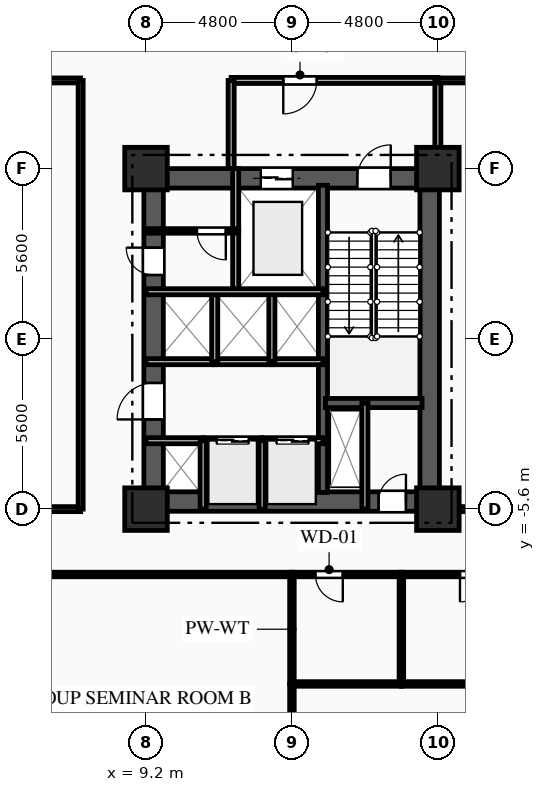
"""IFC4 building model, lengths in metres.
Left out: names, types, materials, properties, quantities, classifications, styles, units other than length and angle.
Written with IfcOpenShell. Run it as: python <this file> out.ifc"""

import sys

from ifc_helpers import new_model, si_unit, direction, frame, frame_2d, origin, origin_2d, place, context, subcontext, project, spatial, rectangle, extrude, element, fill, save


model = new_model("IFC4")
c1 = context("Model", 3, precision=1e-05, world=origin(), true_north=direction((0.0, 1.0)))
c2 = subcontext(c1, "Body", "Model", "MODEL_VIEW")
j1 = project(units=[si_unit("LENGTHUNIT", "METRE"), si_unit("PLANEANGLEUNIT", "RADIAN")], contexts=[c1])
p1 = place(None, origin())
s1 = spatial("IfcSite", under=j1, at=p1, CompositionType="ELEMENT")
p2 = place(p1, origin())
s2 = spatial("IfcBuilding", under=s1, at=p2, CompositionType="ELEMENT")
p3 = place(p2, frame((0.0, 0.0, 4.5)))
s3 = spatial("IfcBuildingStorey", under=s2, at=p3, CompositionType="ELEMENT", Elevation=4.5)
for number, where, z_axis, x_axis in (
    (1, (9.2, -5.6, 0.0), (0.0, 0.0, 1.0), (1.0, 0.0, 0.0)),
    (2, (9.2, 5.6, 0.0), (0.0, 0.0, 1.0), (1.0, 0.0, 0.0)),
    (3, (18.8, -5.6, 0.0), (0.0, 0.0, 1.0), (1.0, 0.0, 0.0)),
    (4, (18.8, 5.6, 0.0), (0.0, 0.0, 1.0), (1.0, 0.0, 0.0)),
):
    element("IfcColumn", number, at=place(p3, frame(where, z_axis=z_axis, x_axis=x_axis)), inside=s3, PredefinedType="COLUMN", context=c2, shape_type="SweptSolid", body=[
        extrude(rectangle(XDim=1.4, YDim=1.4, at=origin_2d()), origin(), (0.0, 0.0, 1.0), 4.5),
    ])
p4 = place(p3, frame((9.2, 5.28, 0.0), z_axis=(0.0, 0.0, 1.0), x_axis=(1.0, 0.0, 0.0)))
e5 = element("IfcWall", 5, at=p4, inside=s3, PredefinedType="SHEAR", context=c2, shape_type="SweptSolid", body=[
    extrude(rectangle(XDim=9.6, YDim=0.64, at=frame_2d((4.8, 0.0))), origin(), (0.0, 0.0, 1.0), 4.17),
])
p5 = place(p4, frame((6.95, 0.0, 0.0)))
e6 = element("IfcOpeningElement", 6, at=p5, cuts=e5, PredefinedType="OPENING", context=c2, shape_type="SweptSolid", body=[
    extrude(rectangle(XDim=1.1, YDim=2.15, at=frame_2d((0.55, 1.075))), frame((0.0, 0.33, 0.0), z_axis=(0.0, -1.0, 0.0), x_axis=(1.0, 0.0, 0.0)), (0.0, 0.0, 1.0), 0.66),
])
p6 = place(p4, frame((3.775, 0.0, 0.0)))
e7 = element("IfcOpeningElement", 7, at=p6, cuts=e5, PredefinedType="OPENING", context=c2, shape_type="SweptSolid", body=[
    extrude(rectangle(XDim=1.05, YDim=2.1, at=frame_2d((0.525, 1.05))), frame((0.0, 0.33, 0.0), z_axis=(0.0, -1.0, 0.0), x_axis=(1.0, 0.0, 0.0)), (0.0, 0.0, 1.0), 0.66),
])
p7 = place(p3, frame((9.2, -5.35, 0.0), z_axis=(0.0, 0.0, 1.0), x_axis=(1.0, 0.0, 0.0)))
e8 = element("IfcWall", 8, at=p7, inside=s3, PredefinedType="SHEAR", context=c2, shape_type="SweptSolid", body=[
    extrude(rectangle(XDim=9.6, YDim=0.64, at=frame_2d((4.8, 0.0))), origin(), (0.0, 0.0, 1.0), 4.17),
])
p8 = place(p7, frame((7.65, 0.0, 0.0)))
e9 = element("IfcOpeningElement", 9, at=p8, cuts=e8, PredefinedType="OPENING", context=c2, shape_type="SweptSolid", body=[
    extrude(rectangle(XDim=0.9, YDim=2.1, at=frame_2d((0.45, 1.05))), frame((0.0, 0.33, 0.0), z_axis=(0.0, -1.0, 0.0), x_axis=(1.0, 0.0, 0.0)), (0.0, 0.0, 1.0), 0.66),
])
p9 = place(p3, frame((9.45, -5.05, 0.0), z_axis=(0.0, 0.0, 1.0), x_axis=(0.0, 1.0, 0.0)))
e10 = element("IfcWall", 10, at=p9, inside=s3, PredefinedType="SHEAR", context=c2, shape_type="SweptSolid", body=[
    extrude(rectangle(XDim=10.1, YDim=0.64, at=frame_2d((5.05, 0.0))), origin(), (0.0, 0.0, 1.0), 4.17),
])
p10 = place(p9, frame((7.15, 0.0, 0.0)))
e11 = element("IfcOpeningElement", 11, at=p10, cuts=e10, PredefinedType="OPENING", context=c2, shape_type="SweptSolid", body=[
    extrude(rectangle(XDim=0.9, YDim=2.1, at=frame_2d((0.45, 1.05))), frame((0.0, 0.33, 0.0), z_axis=(0.0, -1.0, 0.0), x_axis=(1.0, 0.0, 0.0)), (0.0, 0.0, 1.0), 0.66),
])
p11 = place(p9, frame((2.4, 0.0, 0.0)))
e12 = element("IfcOpeningElement", 12, at=p11, cuts=e10, PredefinedType="OPENING", context=c2, shape_type="SweptSolid", body=[
    extrude(rectangle(XDim=1.2, YDim=2.15, at=frame_2d((0.6, 1.075))), frame((0.0, 0.33, 0.0), z_axis=(0.0, -1.0, 0.0), x_axis=(1.0, 0.0, 0.0)), (0.0, 0.0, 1.0), 0.66),
])
p12 = place(p3, frame((18.53, -5.05, 0.0), z_axis=(0.0, 0.0, 1.0), x_axis=(0.0, 1.0, 0.0)))
e13 = element("IfcWall", 13, at=p12, inside=s3, PredefinedType="SHEAR", context=c2, shape_type="SweptSolid", body=[
    extrude(rectangle(XDim=10.1, YDim=0.64, at=frame_2d((5.05, 0.0))), origin(), (0.0, 0.0, 1.0), 4.17),
])
p13 = place(p3, frame((15.02, -5.05, 0.0), z_axis=(0.0, 0.0, 1.0), x_axis=(0.0, 1.0, 0.0)))
e14 = element("IfcWall", 14, at=p13, inside=s3, PredefinedType="SHEAR", context=c2, shape_type="SweptSolid", body=[
    extrude(rectangle(XDim=10.1, YDim=0.3, at=frame_2d((5.05, 0.0))), origin(), (0.0, 0.0, 1.0), 4.17),
])
p14 = place(p3, frame((15.1, -2.11, 0.0), z_axis=(0.0, 0.0, 1.0), x_axis=(1.0, 0.0, 0.0)))
e15 = element("IfcWall", 15, at=p14, inside=s3, PredefinedType="SHEAR", context=c2, shape_type="SweptSolid", body=[
    extrude(rectangle(XDim=3.18, YDim=0.3, at=frame_2d((1.59, 0.0))), origin(), (0.0, 0.0, 1.0), 4.17),
])
p15 = place(p3, frame((16.4, -2.11, 0.0), z_axis=(0.0, 0.0, 1.0), x_axis=(0.0, -1.0, 0.0)))
e16 = element("IfcWall", 16, at=p15, inside=s3, PredefinedType="PARTITIONING", context=c2, shape_type="SweptSolid", body=[
    extrude(rectangle(XDim=3.49, YDim=0.2, at=frame_2d((1.745, 0.0))), origin(), (0.0, 0.0, 1.0), 4.17),
])
p16 = place(p3, frame((12.15, 3.55, 0.0), z_axis=(0.0, 0.0, 1.0), x_axis=(0.0, -1.0, 0.0)))
e17 = element("IfcWall", 17, at=p16, inside=s3, PredefinedType="PARTITIONING", context=c2, shape_type="SweptSolid", body=[
    extrude(rectangle(XDim=2.0, YDim=0.2, at=frame_2d((1.0, 0.0))), origin(), (0.0, 0.0, 1.0), 4.17),
])
p17 = place(p3, frame((12.15, 5.6, 0.0), z_axis=(0.0, 0.0, 1.0), x_axis=(0.0, -1.0, 0.0)))
e18 = element("IfcWall", 18, at=p17, inside=s3, PredefinedType="PARTITIONING", context=c2, shape_type="SweptSolid", body=[
    extrude(rectangle(XDim=2.05, YDim=0.2, at=frame_2d((1.025, 0.0))), origin(), (0.0, 0.0, 1.0), 4.17),
])
p18 = place(p3, frame((18.8, 8.5, 0.0), z_axis=(0.0, 0.0, 1.0), x_axis=(-1.0, 0.0, 0.0)))
e19 = element("IfcWall", 19, at=p18, inside=s3, PredefinedType="PARTITIONING", context=c2, shape_type="SweptSolid", body=[
    extrude(rectangle(XDim=6.8, YDim=0.2, at=frame_2d((3.4, 0.0))), origin(), (0.0, 0.0, 1.0), 4.17),
])
p19 = place(p18, frame((3.985, 0.0, 0.0)))
e20 = element("IfcOpeningElement", 20, at=p19, cuts=e19, PredefinedType="OPENING", context=c2, shape_type="SweptSolid", body=[
    extrude(rectangle(XDim=1.1, YDim=2.15, at=frame_2d((0.55, 1.075))), frame((0.0, 0.11, 0.0), z_axis=(0.0, -1.0, 0.0), x_axis=(1.0, 0.0, 0.0)), (0.0, 0.0, 1.0), 0.22),
])
p20 = place(p3, frame((12.0, 8.5, 0.0), z_axis=(0.0, 0.0, 1.0), x_axis=(0.0, -1.0, 0.0)))
e21 = element("IfcWall", 21, at=p20, inside=s3, PredefinedType="PARTITIONING", context=c2, shape_type="SweptSolid", body=[
    extrude(rectangle(XDim=2.9, YDim=0.2, at=frame_2d((1.45, 0.0))), origin(), (0.0, 0.0, 1.0), 4.17),
])
p21 = place(p3, frame((18.8, 5.6, 0.0), z_axis=(0.0, 0.0, 1.0), x_axis=(0.0, 1.0, 0.0)))
e22 = element("IfcWall", 22, at=p21, inside=s3, PredefinedType="PARTITIONING", context=c2, shape_type="SweptSolid", body=[
    extrude(rectangle(XDim=2.9, YDim=0.2, at=frame_2d((1.45, 0.0))), origin(), (0.0, 0.0, 1.0), 3.655),
])
p22 = place(p3, frame((12.15, 3.55, 0.0), z_axis=(0.0, 0.0, 1.0), x_axis=(-1.0, 0.0, 0.0)))
e23 = element("IfcWall", 23, at=p22, inside=s3, PredefinedType="PARTITIONING", context=c2, shape_type="SweptSolid", body=[
    extrude(rectangle(XDim=2.95, YDim=0.15, at=frame_2d((1.475, 0.0))), origin(), (0.0, 0.0, 1.0), 4.17),
])
p23 = place(p22, frame((0.325, 0.0, 0.0)))
e24 = element("IfcOpeningElement", 24, at=p23, cuts=e23, PredefinedType="OPENING", context=c2, shape_type="SweptSolid", body=[
    extrude(rectangle(XDim=0.95, YDim=2.1, at=frame_2d((0.475, 1.05))), frame((0.0, 0.085, 0.0), z_axis=(0.0, -1.0, 0.0), x_axis=(1.0, 0.0, 0.0)), (0.0, 0.0, 1.0), 0.17),
])
p24 = place(p3, frame((9.2, -3.35, 0.0), z_axis=(0.0, 0.0, 1.0), x_axis=(1.0, 0.0, 0.0)))
e25 = element("IfcWall", 25, at=p24, inside=s3, PredefinedType="PARTITIONING", context=c2, shape_type="SweptSolid", body=[
    extrude(rectangle(XDim=1.88, YDim=0.2, at=frame_2d((0.94, 0.0))), origin(), (0.0, 0.0, 1.0), 3.885),
])
p25 = place(p3, frame((11.08, -3.35, 0.0), z_axis=(0.0, 0.0, 1.0), x_axis=(1.0, 0.0, 0.0)))
e26 = element("IfcWall", 26, at=p25, inside=s3, PredefinedType="PARTITIONING", context=c2, shape_type="SweptSolid", body=[
    extrude(rectangle(XDim=1.94, YDim=0.2, at=frame_2d((0.97, 0.0))), origin(), (0.0, 0.0, 1.0), 4.17),
])
p26 = place(p25, frame((0.445, 0.0, 0.0)))
e27 = element("IfcOpeningElement", 27, at=p26, cuts=e26, PredefinedType="OPENING", context=c2, shape_type="SweptSolid", body=[
    extrude(rectangle(XDim=1.05, YDim=2.1, at=frame_2d((0.525, 1.05))), frame((0.0, 0.11, 0.0), z_axis=(0.0, -1.0, 0.0), x_axis=(1.0, 0.0, 0.0)), (0.0, 0.0, 1.0), 0.22),
])
p27 = place(p3, frame((13.02, -3.35, 0.0), z_axis=(0.0, 0.0, 1.0), x_axis=(1.0, 0.0, 0.0)))
e28 = element("IfcWall", 28, at=p27, inside=s3, PredefinedType="PARTITIONING", context=c2, shape_type="SweptSolid", body=[
    extrude(rectangle(XDim=2.0, YDim=0.2, at=frame_2d((1.0, 0.0))), origin(), (0.0, 0.0, 1.0), 4.17),
])
p28 = place(p27, frame((0.475, 0.0, 0.0)))
e29 = element("IfcOpeningElement", 29, at=p28, cuts=e28, PredefinedType="OPENING", context=c2, shape_type="SweptSolid", body=[
    extrude(rectangle(XDim=1.05, YDim=2.1, at=frame_2d((0.525, 1.05))), frame((0.0, 0.11, 0.0), z_axis=(0.0, -1.0, 0.0), x_axis=(1.0, 0.0, 0.0)), (0.0, 0.0, 1.0), 0.22),
])
p29 = place(p3, frame((11.46, -0.75, 0.0), z_axis=(0.0, 0.0, 1.0), x_axis=(-1.0, 0.0, 0.0)))
e30 = element("IfcWall", 30, at=p29, inside=s3, PredefinedType="PARTITIONING", context=c2, shape_type="SweptSolid", body=[
    extrude(rectangle(XDim=2.26, YDim=0.2, at=frame_2d((1.13, 0.0))), origin(), (0.0, 0.0, 1.0), 4.17),
])
p30 = place(p3, frame((13.34, -0.75, 0.0), z_axis=(0.0, 0.0, 1.0), x_axis=(-1.0, 0.0, 0.0)))
e31 = element("IfcWall", 31, at=p30, inside=s3, PredefinedType="PARTITIONING", context=c2, shape_type="SweptSolid", body=[
    extrude(rectangle(XDim=1.88, YDim=0.2, at=frame_2d((0.94, 0.0))), origin(), (0.0, 0.0, 1.0), 4.17),
])
p31 = place(p3, frame((15.02, -0.75, 0.0), z_axis=(0.0, 0.0, 1.0), x_axis=(-1.0, 0.0, 0.0)))
e32 = element("IfcWall", 32, at=p31, inside=s3, PredefinedType="PARTITIONING", context=c2, shape_type="SweptSolid", body=[
    extrude(rectangle(XDim=1.68, YDim=0.2, at=frame_2d((0.84, 0.0))), origin(), (0.0, 0.0, 1.0), 4.17),
])
for number, where, z_axis, x_axis in (
    (33, (11.08, -5.6, 0.0), (0.0, 0.0, 1.0), (0.0, 1.0, 0.0)),
    (34, (13.02, -5.6, 0.0), (0.0, 0.0, 1.0), (0.0, 1.0, 0.0)),
):
    element("IfcWall", number, at=place(p3, frame(where, z_axis=z_axis, x_axis=x_axis)), inside=s3, PredefinedType="PARTITIONING", context=c2, shape_type="SweptSolid", body=[
        extrude(rectangle(XDim=2.25, YDim=0.2, at=frame_2d((1.125, 0.0))), origin(), (0.0, 0.0, 1.0), 4.17),
    ])
for number, where, z_axis, x_axis in (
    (35, (11.46, -0.75, 0.0), (0.0, 0.0, 1.0), (0.0, 1.0, 0.0)),
    (36, (13.34, -0.75, 0.0), (0.0, 0.0, 1.0), (0.0, 1.0, 0.0)),
):
    element("IfcWall", number, at=place(p3, frame(where, z_axis=z_axis, x_axis=x_axis)), inside=s3, PredefinedType="PARTITIONING", context=c2, shape_type="SweptSolid", body=[
        extrude(rectangle(XDim=2.3, YDim=0.2, at=frame_2d((1.15, 0.0))), origin(), (0.0, 0.0, 1.0), 4.17),
    ])
p32 = place(p3, frame((7.05, 8.5, 0.0), z_axis=(0.0, 0.0, 1.0), x_axis=(-1.0, 0.0, 0.0)))
e37 = element("IfcWall", 37, at=p32, inside=s3, PredefinedType="PARTITIONING", context=c2, shape_type="SweptSolid", body=[
    extrude(rectangle(XDim=7.05, YDim=0.165, at=frame_2d((3.525, 0.0))), origin(), (0.0, 0.0, 1.0), 4.17),
])
p33 = place(p3, frame((24.0, 8.5, 0.0), z_axis=(0.0, 0.0, 1.0), x_axis=(-1.0, 0.0, 0.0)))
e38 = element("IfcWall", 38, at=p33, inside=s3, PredefinedType="PARTITIONING", context=c2, shape_type="SweptSolid", body=[
    extrude(rectangle(XDim=5.2, YDim=0.165, at=frame_2d((2.6, 0.0))), origin(), (0.0, 0.0, 1.0), 4.17),
])
p34 = place(p33, frame((0.91, 0.0, 0.0)))
e39 = element("IfcOpeningElement", 39, at=p34, cuts=e38, PredefinedType="OPENING", context=c2, shape_type="SweptSolid", body=[
    extrude(rectangle(XDim=1.4, YDim=2.3, at=frame_2d((0.7, 1.15))), frame((0.0, 0.093, 0.0), z_axis=(0.0, -1.0, 0.0), x_axis=(1.0, 0.0, 0.0)), (0.0, 0.0, 1.0), 0.185),
])
p35 = place(p3, frame((14.0, -7.75, 0.0), z_axis=(0.0, 0.0, 1.0), x_axis=(-1.0, 0.0, 0.0)))
e40 = element("IfcWall", 40, at=p35, inside=s3, PredefinedType="PARTITIONING", context=c2, shape_type="SweptSolid", body=[
    extrude(rectangle(XDim=14.0, YDim=0.15, at=frame_2d((7.0, 0.0))), origin(), (0.0, 0.0, 1.0), 4.17),
])
p36 = place(p35, frame((10.896, 0.0, 0.0)))
e41 = element("IfcOpeningElement", 41, at=p36, cuts=e40, PredefinedType="OPENING", context=c2, shape_type="SweptSolid", body=[
    extrude(rectangle(XDim=1.05, YDim=2.15, at=frame_2d((0.525, 1.075))), frame((0.0, 0.085, 0.0), z_axis=(0.0, -1.0, 0.0), x_axis=(1.0, 0.0, 0.0)), (0.0, 0.0, 1.0), 0.17),
])
p37 = place(p3, frame((17.6, -7.75, 0.0), z_axis=(0.0, 0.0, 1.0), x_axis=(-1.0, 0.0, 0.0)))
e42 = element("IfcWall", 42, at=p37, inside=s3, PredefinedType="PLUMBINGWALL", context=c2, shape_type="SweptSolid", body=[
    extrude(rectangle(XDim=3.6, YDim=0.15, at=frame_2d((1.8, 0.0))), origin(), (0.0, 0.0, 1.0), 4.17),
])
p38 = place(p37, frame((1.927, 0.0, 0.0)))
e43 = element("IfcOpeningElement", 43, at=p38, cuts=e42, PredefinedType="OPENING", context=c2, shape_type="SweptSolid", body=[
    extrude(rectangle(XDim=0.9, YDim=2.1, at=frame_2d((0.45, 1.05))), frame((0.0, 0.085, 0.0), z_axis=(0.0, -1.0, 0.0), x_axis=(1.0, 0.0, 0.0)), (0.0, 0.0, 1.0), 0.17),
])
p39 = place(p3, frame((21.2, -7.75, 0.0), z_axis=(0.0, 0.0, 1.0), x_axis=(-1.0, 0.0, 0.0)))
e44 = element("IfcWall", 44, at=p39, inside=s3, PredefinedType="PLUMBINGWALL", context=c2, shape_type="SweptSolid", body=[
    extrude(rectangle(XDim=3.6, YDim=0.15, at=frame_2d((1.8, 0.0))), origin(), (0.0, 0.0, 1.0), 4.17),
])
p40 = place(p39, frame((0.772, 0.0, 0.0)))
e45 = element("IfcOpeningElement", 45, at=p40, cuts=e44, PredefinedType="OPENING", context=c2, shape_type="SweptSolid", body=[
    extrude(rectangle(XDim=0.9, YDim=2.1, at=frame_2d((0.45, 1.05))), frame((0.0, 0.085, 0.0), z_axis=(0.0, -1.0, 0.0), x_axis=(1.0, 0.0, 0.0)), (0.0, 0.0, 1.0), 0.17),
])
p41 = place(p3, frame((0.0, -5.6, 0.0), z_axis=(0.0, 0.0, 1.0), x_axis=(1.0, 0.0, 0.0)))
e46 = element("IfcWall", 46, at=p41, inside=s3, PredefinedType="PARTITIONING", context=c2, shape_type="SweptSolid", body=[
    extrude(rectangle(XDim=7.05, YDim=0.165, at=frame_2d((3.525, 0.0))), origin(), (0.0, 0.0, 1.0), 3.655),
])
p42 = place(p3, frame((18.8, -5.6, 0.0), z_axis=(0.0, 0.0, 1.0), x_axis=(1.0, 0.0, 0.0)))
e47 = element("IfcWall", 47, at=p42, inside=s3, PredefinedType="PARTITIONING", context=c2, shape_type="SweptSolid", body=[
    extrude(rectangle(XDim=5.2, YDim=0.165, at=frame_2d((2.6, 0.0))), origin(), (0.0, 0.0, 1.0), 4.17),
])
p43 = place(p3, frame((7.05, -5.6, 0.0), z_axis=(0.0, 0.0, 1.0), x_axis=(0.0, 1.0, 0.0)))
e48 = element("IfcWall", 48, at=p43, inside=s3, PredefinedType="PARTITIONING", context=c2, shape_type="SweptSolid", body=[
    extrude(rectangle(XDim=14.1, YDim=0.165, at=frame_2d((7.05, 0.0))), origin(), (0.0, 0.0, 1.0), 4.17),
])
p44 = place(p3, frame((14.0, -7.75, 0.0), z_axis=(0.0, 0.0, 1.0), x_axis=(0.0, -1.0, 0.0)))
e49 = element("IfcWall", 49, at=p44, inside=s3, PredefinedType="PLUMBINGWALL", context=c2, shape_type="SweptSolid", body=[
    extrude(rectangle(XDim=3.6, YDim=0.15, at=frame_2d((1.8, 0.0))), origin(), (0.0, 0.0, 1.0), 4.17),
])
p45 = place(p3, frame((14.0, -11.35, 0.0), z_axis=(0.0, 0.0, 1.0), x_axis=(0.0, -1.0, 0.0)))
e50 = element("IfcWall", 50, at=p45, inside=s3, PredefinedType="PARTITIONING", context=c2, shape_type="SweptSolid", body=[
    extrude(rectangle(XDim=13.45, YDim=0.15, at=frame_2d((6.725, 0.0))), origin(), (0.0, 0.0, 1.0), 4.17),
])
for number, where, z_axis, x_axis in (
    (51, (17.6, -7.75, 0.0), (0.0, 0.0, 1.0), (0.0, -1.0, 0.0)),
    (52, (17.6, -11.35, 0.0), (0.0, 0.0, 1.0), (-1.0, 0.0, 0.0)),
):
    element("IfcWall", number, at=place(p3, frame(where, z_axis=z_axis, x_axis=x_axis)), inside=s3, PredefinedType="PLUMBINGWALL", context=c2, shape_type="SweptSolid", body=[
        extrude(rectangle(XDim=3.6, YDim=0.15, at=frame_2d((1.8, 0.0))), origin(), (0.0, 0.0, 1.0), 4.17),
    ])
p46 = place(p3, frame((21.2, -11.35, 0.0), z_axis=(0.0, 0.0, 1.0), x_axis=(-1.0, 0.0, 0.0)))
e53 = element("IfcWall", 53, at=p46, inside=s3, PredefinedType="PLUMBINGWALL", context=c2, shape_type="SweptSolid", body=[
    extrude(rectangle(XDim=3.6, YDim=0.15, at=frame_2d((1.8, 0.0))), origin(), (0.0, 0.0, 1.0), 4.17),
])
p47 = place(p3, frame((9.2, 1.55, 0.0), z_axis=(0.0, 0.0, 1.0), x_axis=(1.0, 0.0, 0.0)))
e54 = element("IfcWall", 54, at=p47, inside=s3, PredefinedType="PARTITIONING", context=c2, shape_type="SweptSolid", body=[
    extrude(rectangle(XDim=5.82, YDim=0.2, at=frame_2d((2.91, 0.0))), origin(), (0.0, 0.0, 1.0), 4.17),
])
p48 = place(p5, origin())
e55 = element("IfcDoor", 55, at=p48, inside=s3, OperationType="SINGLE_SWING_RIGHT", PredefinedType="DOOR", context=c2, shape_type="SweptSolid", body=[
    extrude(rectangle(XDim=1.1, YDim=2.15, at=frame_2d((0.55, 1.075))), frame((0.0, 0.025, 0.0), z_axis=(0.0, -1.0, 0.0), x_axis=(1.0, 0.0, 0.0)), (0.0, 0.0, 1.0), 0.05),
])
fill(e6, e55)
p49 = place(p6, origin())
e56 = element("IfcDoor", 56, at=p49, inside=s3, OperationType="DOUBLE_DOOR_SLIDING", PredefinedType="DOOR", context=c2, shape_type="SweptSolid", body=[
    extrude(rectangle(XDim=1.05, YDim=2.1, at=frame_2d((0.525, 1.05))), frame((0.0, 0.025, 0.0), z_axis=(0.0, -1.0, 0.0), x_axis=(1.0, 0.0, 0.0)), (0.0, 0.0, 1.0), 0.05),
])
fill(e7, e56)
p50 = place(p8, origin())
e57 = element("IfcDoor", 57, at=p50, inside=s3, OperationType="SINGLE_SWING_RIGHT", PredefinedType="DOOR", context=c2, shape_type="SweptSolid", body=[
    extrude(rectangle(XDim=0.9, YDim=2.1, at=frame_2d((0.45, 1.05))), frame((0.0, 0.025, 0.0), z_axis=(0.0, -1.0, 0.0), x_axis=(1.0, 0.0, 0.0)), (0.0, 0.0, 1.0), 0.05),
])
fill(e9, e57)
p51 = place(p19, origin())
e58 = element("IfcDoor", 58, at=p51, inside=s3, OperationType="SINGLE_SWING_RIGHT", PredefinedType="DOOR", context=c2, shape_type="SweptSolid", body=[
    extrude(rectangle(XDim=1.1, YDim=2.15, at=frame_2d((0.55, 1.075))), frame((0.0, 0.025, 0.0), z_axis=(0.0, -1.0, 0.0), x_axis=(1.0, 0.0, 0.0)), (0.0, 0.0, 1.0), 0.05),
])
fill(e20, e58)
p52 = place(p23, origin())
e59 = element("IfcDoor", 59, at=p52, inside=s3, OperationType="SINGLE_SWING_LEFT", PredefinedType="DOOR", context=c2, shape_type="SweptSolid", body=[
    extrude(rectangle(XDim=0.95, YDim=2.1, at=frame_2d((0.475, 1.05))), frame((0.0, 0.025, 0.0), z_axis=(0.0, -1.0, 0.0), x_axis=(1.0, 0.0, 0.0)), (0.0, 0.0, 1.0), 0.05),
])
fill(e24, e59)
p53 = place(p10, origin())
e60 = element("IfcDoor", 60, at=p53, inside=s3, OperationType="SINGLE_SWING_RIGHT", PredefinedType="DOOR", context=c2, shape_type="SweptSolid", body=[
    extrude(rectangle(XDim=0.9, YDim=2.1, at=frame_2d((0.45, 1.05))), frame((0.0, 0.025, 0.0), z_axis=(0.0, -1.0, 0.0), x_axis=(1.0, 0.0, 0.0)), (0.0, 0.0, 1.0), 0.05),
])
fill(e11, e60)
p54 = place(p26, origin())
e61 = element("IfcDoor", 61, at=p54, inside=s3, OperationType="DOUBLE_DOOR_SLIDING", PredefinedType="DOOR", context=c2, shape_type="SweptSolid", body=[
    extrude(rectangle(XDim=1.05, YDim=2.1, at=frame_2d((0.525, 1.05))), frame((0.0, 0.025, 0.0), z_axis=(0.0, -1.0, 0.0), x_axis=(1.0, 0.0, 0.0)), (0.0, 0.0, 1.0), 0.05),
])
fill(e27, e61)
p55 = place(p28, origin())
e62 = element("IfcDoor", 62, at=p55, inside=s3, OperationType="DOUBLE_DOOR_SLIDING", PredefinedType="DOOR", context=c2, shape_type="SweptSolid", body=[
    extrude(rectangle(XDim=1.05, YDim=2.1, at=frame_2d((0.525, 1.05))), frame((0.0, 0.025, 0.0), z_axis=(0.0, -1.0, 0.0), x_axis=(1.0, 0.0, 0.0)), (0.0, 0.0, 1.0), 0.05),
])
fill(e29, e62)
p56 = place(p11, origin())
e63 = element("IfcDoor", 63, at=p56, inside=s3, OperationType="SINGLE_SWING_LEFT", PredefinedType="DOOR", context=c2, shape_type="SweptSolid", body=[
    extrude(rectangle(XDim=1.2, YDim=2.15, at=frame_2d((0.6, 1.075))), frame((0.0, 0.025, 0.0), z_axis=(0.0, -1.0, 0.0), x_axis=(1.0, 0.0, 0.0)), (0.0, 0.0, 1.0), 0.05),
])
fill(e12, e63)
p57 = place(p38, origin())
e64 = element("IfcDoor", 64, at=p57, inside=s3, OperationType="SINGLE_SWING_LEFT", PredefinedType="DOOR", context=c2, shape_type="SweptSolid", body=[
    extrude(rectangle(XDim=0.9, YDim=2.1, at=frame_2d((0.45, 1.05))), frame((0.0, 0.025, 0.0), z_axis=(0.0, -1.0, 0.0), x_axis=(1.0, 0.0, 0.0)), (0.0, 0.0, 1.0), 0.05),
])
fill(e43, e64)
p58 = place(p40, origin())
e65 = element("IfcDoor", 65, at=p58, inside=s3, OperationType="SINGLE_SWING_RIGHT", PredefinedType="DOOR", context=c2, shape_type="SweptSolid", body=[
    extrude(rectangle(XDim=0.9, YDim=2.1, at=frame_2d((0.45, 1.05))), frame((0.0, 0.025, 0.0), z_axis=(0.0, -1.0, 0.0), x_axis=(1.0, 0.0, 0.0)), (0.0, 0.0, 1.0), 0.05),
])
fill(e45, e65)
save(model, sys.argv[1])
